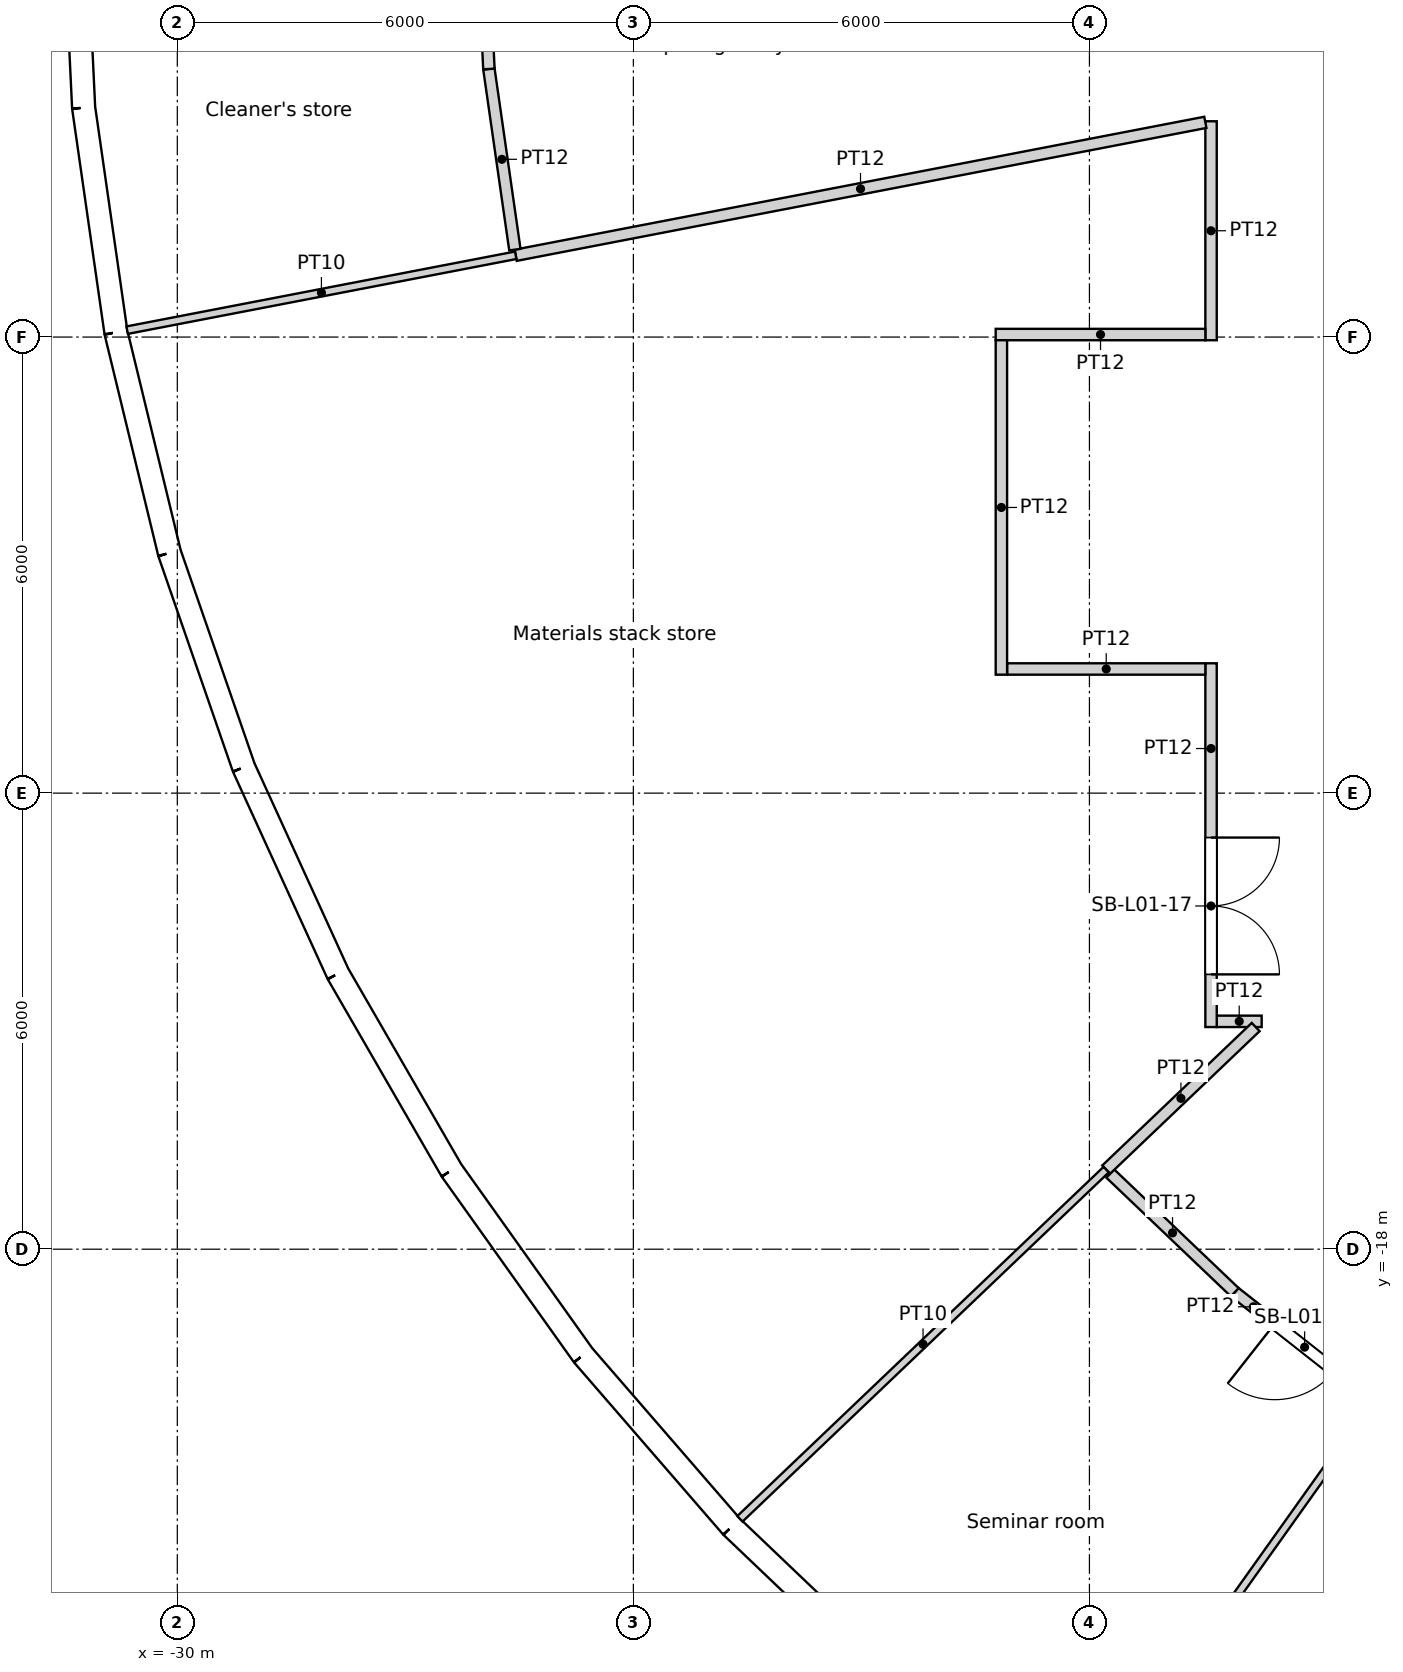
"""IFC4 building model, lengths in metres.
Left out: names, types, materials, properties, quantities, classifications, styles, units other than length and angle.
Written with IfcOpenShell. Run it as: python <this file> out.ifc"""

import sys

from ifc_helpers import new_model, si_unit, direction, frame, frame_2d, origin, origin_2d, place, context, subcontext, project, spatial, rectangle, circle, extrude, element, fill, save


model = new_model("IFC4")
c1 = context("Model", 3, precision=1e-05, world=origin(), true_north=direction((0.0, 1.0)))
c2 = subcontext(c1, "Body", "Model", "MODEL_VIEW")
j1 = project(units=[si_unit("LENGTHUNIT", "METRE"), si_unit("PLANEANGLEUNIT", "RADIAN")], contexts=[c1])
p1 = place(None, origin())
s1 = spatial("IfcSite", under=j1, at=p1, CompositionType="ELEMENT")
p2 = place(p1, origin())
s2 = spatial("IfcBuilding", under=s1, at=p2, CompositionType="ELEMENT")
p3 = place(p2, frame((0.0, 0.0, 9.0)))
s3 = spatial("IfcBuildingStorey", under=s2, at=p3, CompositionType="ELEMENT", Elevation=9.0)
for number, where, z_axis, x_axis in (
    (1, (-30.137, -2.878, 0.0), (0.0, 0.0, 1.0), (1.0, 0.0, 0.0)),
    (2, (-29.048, -8.529, 0.0), (0.0, 0.0, 1.0), (1.0, 0.0, 0.0)),
    (3, (-26.909, -13.873, 0.0), (0.0, 0.0, 1.0), (1.0, 0.0, 0.0)),
    (4, (-23.797, -18.715, 0.0), (0.0, 0.0, 1.0), (1.0, 0.0, 0.0)),
    (5, (-19.826, -22.88, 0.0), (0.0, 0.0, 1.0), (1.0, 0.0, 0.0)),
):
    element("IfcColumn", number, at=place(p3, frame(where, z_axis=z_axis, x_axis=x_axis)), inside=s3, PredefinedType="COLUMN", context=c2, shape_type="SweptSolid", body=[
        extrude(circle(Radius=0.7, at=origin_2d()), origin(), (0.0, 0.0, 1.0), 4.8),
    ])
for number, where, z_axis, x_axis in (
    (6, (-24.382, -2.85, 0.0), (0.0, 0.0, 1.0), (1.0, 0.0, 0.0)),
    (7, (-23.067, -8.396, 0.0), (0.0, 0.0, 1.0), (1.0, 0.0, 0.0)),
    (8, (-20.509, -13.489, 0.0), (0.0, 0.0, 1.0), (1.0, 0.0, 0.0)),
    (9, (-16.846, -17.855, 0.0), (0.0, 0.0, 1.0), (1.0, 0.0, 0.0)),
):
    element("IfcColumn", number, at=place(p3, frame(where, z_axis=z_axis, x_axis=x_axis)), inside=s3, PredefinedType="COLUMN", context=c2, shape_type="SweptSolid", body=[
        extrude(circle(Radius=0.75, at=origin_2d()), origin(), (0.0, 0.0, 1.0), 4.8),
    ])
for number, where, z_axis, x_axis in (
    (10, (-18.612, -2.805, 0.0), (0.0, 0.0, 1.0), (1.0, 0.0, 0.0)),
    (11, (-16.958, -8.167, 0.0), (0.0, 0.0, 1.0), (1.0, 0.0, 0.0)),
):
    element("IfcColumn", number, at=place(p3, frame(where, z_axis=z_axis, x_axis=x_axis)), inside=s3, PredefinedType="COLUMN", context=c2, shape_type="SweptSolid", body=[
        extrude(circle(Radius=0.8, at=origin_2d()), origin(), (0.0, 0.0, 1.0), 4.8),
    ])
p4 = place(p3, frame((-31.375, 0.0, 0.0), z_axis=(0.0, 0.0, 1.0), x_axis=(0.047588458579, -0.998867027492, 0.0)))
e12 = element("IfcWall", 12, at=p4, inside=s3, PredefinedType="SOLIDWALL", context=c2, shape_type="SweptSolid", body=[
    extrude(rectangle(XDim=2.986, YDim=0.3, at=frame_2d((1.493, 0.0))), origin(), (0.0, 0.0, 1.0), 4.35),
])
p5 = place(p4, frame((1.493, 0.0, 2.0)))
e13 = element("IfcOpeningElement", 13, at=p5, cuts=e12, PredefinedType="OPENING", context=c2, shape_type="SweptSolid", body=[
    extrude(circle(Radius=1.2, at=origin_2d()), frame((0.0, 0.16, 0.0), z_axis=(0.0, -1.0, 0.0), x_axis=(1.0, 0.0, 0.0)), (0.0, 0.0, 1.0), 0.32),
])
p6 = place(p3, frame((-31.232, -2.982, 0.0), z_axis=(0.0, 0.0, 1.0), x_axis=(0.142360001917, -0.989814947278, 0.0)))
e14 = element("IfcWall", 14, at=p6, inside=s3, PredefinedType="SOLIDWALL", context=c2, shape_type="SweptSolid", body=[
    extrude(rectangle(XDim=2.986, YDim=0.3, at=frame_2d((1.493, 0.0))), origin(), (0.0, 0.0, 1.0), 4.35),
])
p7 = place(p6, frame((1.493, 0.0, 2.0)))
e15 = element("IfcOpeningElement", 15, at=p7, cuts=e14, PredefinedType="OPENING", context=c2, shape_type="SweptSolid", body=[
    extrude(circle(Radius=1.2, at=origin_2d()), frame((0.0, 0.16, 0.0), z_axis=(0.0, -1.0, 0.0), x_axis=(1.0, 0.0, 0.0)), (0.0, 0.0, 1.0), 0.32),
])
p8 = place(p3, frame((-30.807, -5.938, 0.0), z_axis=(0.0, 0.0, 1.0), x_axis=(0.235756834479, -0.971812078026, 0.0)))
e16 = element("IfcWall", 16, at=p8, inside=s3, PredefinedType="SOLIDWALL", context=c2, shape_type="SweptSolid", body=[
    extrude(rectangle(XDim=2.986, YDim=0.3, at=frame_2d((1.493, 0.0))), origin(), (0.0, 0.0, 1.0), 4.35),
])
p9 = place(p8, frame((1.493, 0.0, 2.0)))
e17 = element("IfcOpeningElement", 17, at=p9, cuts=e16, PredefinedType="OPENING", context=c2, shape_type="SweptSolid", body=[
    extrude(circle(Radius=1.2, at=origin_2d()), frame((0.0, 0.16, 0.0), z_axis=(0.0, -1.0, 0.0), x_axis=(1.0, 0.0, 0.0)), (0.0, 0.0, 1.0), 0.32),
])
p10 = place(p3, frame((-30.104, -8.839, 0.0), z_axis=(0.0, 0.0, 1.0), x_axis=(0.327074054052, -0.944998710669, 0.0)))
e18 = element("IfcWall", 18, at=p10, inside=s3, PredefinedType="SOLIDWALL", context=c2, shape_type="SweptSolid", body=[
    extrude(rectangle(XDim=2.986, YDim=0.3, at=frame_2d((1.493, 0.0))), origin(), (0.0, 0.0, 1.0), 4.35),
])
p11 = place(p10, frame((1.493, 0.0, 2.0)))
e19 = element("IfcOpeningElement", 19, at=p11, cuts=e18, PredefinedType="OPENING", context=c2, shape_type="SweptSolid", body=[
    extrude(circle(Radius=1.2, at=origin_2d()), frame((0.0, 0.16, 0.0), z_axis=(0.0, -1.0, 0.0), x_axis=(1.0, 0.0, 0.0)), (0.0, 0.0, 1.0), 0.32),
])
p12 = place(p3, frame((-29.127, -11.661, 0.0), z_axis=(0.0, 0.0, 1.0), x_axis=(0.415373250944, -0.909651066289, 0.0)))
e20 = element("IfcWall", 20, at=p12, inside=s3, PredefinedType="SOLIDWALL", context=c2, shape_type="SweptSolid", body=[
    extrude(rectangle(XDim=2.986, YDim=0.3, at=frame_2d((1.493, 0.0))), origin(), (0.0, 0.0, 1.0), 4.35),
])
p13 = place(p12, frame((1.493, 0.0, 2.0)))
e21 = element("IfcOpeningElement", 21, at=p13, cuts=e20, PredefinedType="OPENING", context=c2, shape_type="SweptSolid", body=[
    extrude(circle(Radius=1.2, at=origin_2d()), frame((0.0, 0.16, 0.0), z_axis=(0.0, -1.0, 0.0), x_axis=(1.0, 0.0, 0.0)), (0.0, 0.0, 1.0), 0.32),
])
p14 = place(p3, frame((-27.887, -14.377, 0.0), z_axis=(0.0, 0.0, 1.0), x_axis=(0.500017373705, -0.866015372839, 0.0)))
e22 = element("IfcWall", 22, at=p14, inside=s3, PredefinedType="SOLIDWALL", context=c2, shape_type="SweptSolid", body=[
    extrude(rectangle(XDim=2.986, YDim=0.3, at=frame_2d((1.493, 0.0))), origin(), (0.0, 0.0, 1.0), 4.35),
])
p15 = place(p14, frame((1.493, 0.0, 2.0)))
e23 = element("IfcOpeningElement", 23, at=p15, cuts=e22, PredefinedType="OPENING", context=c2, shape_type="SweptSolid", body=[
    extrude(circle(Radius=1.2, at=origin_2d()), frame((0.0, 0.16, 0.0), z_axis=(0.0, -1.0, 0.0), x_axis=(1.0, 0.0, 0.0)), (0.0, 0.0, 1.0), 0.32),
])
p16 = place(p3, frame((-26.394, -16.962, 0.0), z_axis=(0.0, 0.0, 1.0), x_axis=(0.580100533892, -0.814544885551, 0.0)))
e24 = element("IfcWall", 24, at=p16, inside=s3, PredefinedType="SOLIDWALL", context=c2, shape_type="SweptSolid", body=[
    extrude(rectangle(XDim=2.986, YDim=0.3, at=frame_2d((1.493, 0.0))), origin(), (0.0, 0.0, 1.0), 4.35),
])
p17 = place(p16, frame((1.493, 0.0, 2.0)))
e25 = element("IfcOpeningElement", 25, at=p17, cuts=e24, PredefinedType="OPENING", context=c2, shape_type="SweptSolid", body=[
    extrude(circle(Radius=1.2, at=origin_2d()), frame((0.0, 0.16, 0.0), z_axis=(0.0, -1.0, 0.0), x_axis=(1.0, 0.0, 0.0)), (0.0, 0.0, 1.0), 0.32),
])
p18 = place(p3, frame((-24.662, -19.394, 0.0), z_axis=(0.0, 0.0, 1.0), x_axis=(0.654809121128, -0.755794294029, 0.0)))
e26 = element("IfcWall", 26, at=p18, inside=s3, PredefinedType="SOLIDWALL", context=c2, shape_type="SweptSolid", body=[
    extrude(rectangle(XDim=2.986, YDim=0.3, at=frame_2d((1.493, 0.0))), origin(), (0.0, 0.0, 1.0), 4.35),
])
p19 = place(p18, frame((1.493, 0.0, 2.0)))
e27 = element("IfcOpeningElement", 27, at=p19, cuts=e26, PredefinedType="OPENING", context=c2, shape_type="SweptSolid", body=[
    extrude(circle(Radius=1.2, at=origin_2d()), frame((0.0, 0.16, 0.0), z_axis=(0.0, -1.0, 0.0), x_axis=(1.0, 0.0, 0.0)), (0.0, 0.0, 1.0), 0.32),
])
p20 = place(p3, frame((-22.707, -21.651, 0.0), z_axis=(0.0, 0.0, 1.0), x_axis=(0.723750841228, -0.690061388444, 0.0)))
e28 = element("IfcWall", 28, at=p20, inside=s3, PredefinedType="SOLIDWALL", context=c2, shape_type="SweptSolid", body=[
    extrude(rectangle(XDim=2.986, YDim=0.3, at=frame_2d((1.493, 0.0))), origin(), (0.0, 0.0, 1.0), 4.35),
])
p21 = place(p20, frame((1.493, 0.0, 2.0)))
e29 = element("IfcOpeningElement", 29, at=p21, cuts=e28, PredefinedType="OPENING", context=c2, shape_type="SweptSolid", body=[
    extrude(circle(Radius=1.2, at=origin_2d()), frame((0.0, 0.16, 0.0), z_axis=(0.0, -1.0, 0.0), x_axis=(1.0, 0.0, 0.0)), (0.0, 0.0, 1.0), 0.32),
])
p22 = place(p3, frame((-30.66, -5.909, 0.0), z_axis=(0.0, 0.0, 1.0), x_axis=(0.981932782009, 0.189230049451, 0.0)))
e30 = element("IfcWall", 30, at=p22, inside=s3, PredefinedType="PARTITIONING", context=c2, shape_type="SweptSolid", body=[
    extrude(rectangle(XDim=5.206, YDim=0.1, at=frame_2d((2.603, 0.0))), origin(), (0.0, 0.0, 1.0), 3.75),
])
p23 = place(p3, frame((-25.901, -2.473, 0.0), z_axis=(0.0, 0.0, 1.0), x_axis=(-0.047565149415, 0.998868137724, 0.0)))
e31 = element("IfcWall", 31, at=p23, inside=s3, PredefinedType="PARTITIONING", context=c2, shape_type="SweptSolid", body=[
    extrude(rectangle(XDim=2.551, YDim=0.15, at=frame_2d((1.275, 0.0))), origin(), (0.0, 0.0, 1.0), 3.75),
])
p24 = place(p23, frame((0.788, 0.0, 0.0)))
e32 = element("IfcOpeningElement", 32, at=p24, cuts=e31, PredefinedType="OPENING", context=c2, shape_type="SweptSolid", body=[
    extrude(rectangle(XDim=0.9, YDim=2.1, at=frame_2d((0.45, 1.05))), frame((0.0, 0.075, 0.0), z_axis=(0.0, -1.0, 0.0), x_axis=(1.0, 0.0, 0.0)), (0.0, 0.0, 1.0), 0.15),
])
p25 = place(p3, frame((-25.901, -2.473, 0.0), z_axis=(0.0, 0.0, 1.0), x_axis=(0.142360874309, -0.989814821806, 0.0)))
e33 = element("IfcWall", 33, at=p25, inside=s3, PredefinedType="PARTITIONING", context=c2, shape_type="SweptSolid", body=[
    extrude(rectangle(XDim=2.401, YDim=0.15, at=frame_2d((1.2, 0.0))), origin(), (0.0, 0.0, 1.0), 3.75),
])
p26 = place(p3, frame((-25.548, -4.924, 0.0), z_axis=(0.0, 0.0, 1.0), x_axis=(0.981926640708, 0.189261914468, 0.0)))
e34 = element("IfcWall", 34, at=p26, inside=s3, PredefinedType="PARTITIONING", context=c2, shape_type="SweptSolid", body=[
    extrude(rectangle(XDim=9.24, YDim=0.15, at=frame_2d((4.62, 0.0))), origin(), (0.0, 0.0, 1.0), 3.75),
])
p27 = place(p3, frame((-22.598, -21.547, 0.0), z_axis=(0.0, 0.0, 1.0), x_axis=(0.723738396813, 0.690074440172, 0.0)))
e35 = element("IfcWall", 35, at=p27, inside=s3, PredefinedType="PARTITIONING", context=c2, shape_type="SweptSolid", body=[
    extrude(rectangle(XDim=6.658, YDim=0.1, at=frame_2d((3.329, 0.0))), origin(), (0.0, 0.0, 1.0), 3.75),
])
p28 = place(p3, frame((-19.083, -10.367, 0.0), z_axis=(0.0, 0.0, 1.0), x_axis=(1.0, 0.0, 0.0)))
e36 = element("IfcWall", 36, at=p28, inside=s3, PredefinedType="PARTITIONING", context=c2, shape_type="SweptSolid", body=[
    extrude(rectangle(XDim=2.608, YDim=0.15, at=frame_2d((1.304, 0.0))), origin(), (0.0, 0.0, 1.0), 3.75),
])
p29 = place(p3, frame((-19.158, -6.042, 0.0), z_axis=(0.0, 0.0, 1.0), x_axis=(0.0, -1.0, 0.0)))
e37 = element("IfcWall", 37, at=p29, inside=s3, PredefinedType="PARTITIONING", context=c2, shape_type="SweptSolid", body=[
    extrude(rectangle(XDim=4.4, YDim=0.15, at=frame_2d((2.2, 0.0))), origin(), (0.0, 0.0, 1.0), 3.75),
])
p30 = place(p3, frame((-18.112, -25.435, 0.0), z_axis=(0.0, 0.0, 1.0), x_axis=(0.580055201519, 0.814577168346, 0.0)))
e38 = element("IfcWall", 38, at=p30, inside=s3, PredefinedType="PARTITIONING", context=c2, shape_type="SweptSolid", body=[
    extrude(rectangle(XDim=6.582, YDim=0.1, at=frame_2d((3.291, 0.0))), origin(), (0.0, 0.0, 1.0), 3.75),
])
p31 = place(p3, frame((-17.726, -17.005, 0.0), z_axis=(0.0, 0.0, 1.0), x_axis=(0.723737544967, -0.690075333573, 0.0)))
e39 = element("IfcWall", 39, at=p31, inside=s3, PredefinedType="PARTITIONING", context=c2, shape_type="SweptSolid", body=[
    extrude(rectangle(XDim=2.263, YDim=0.15, at=frame_2d((1.131, 0.0))), origin(), (0.0, 0.0, 1.0), 3.75),
])
p32 = place(p3, frame((-17.78, -16.953, 0.0), z_axis=(0.0, 0.0, 1.0), x_axis=(0.723749021552, 0.690063296954, 0.0)))
e40 = element("IfcWall", 40, at=p32, inside=s3, PredefinedType="PARTITIONING", context=c2, shape_type="SweptSolid", body=[
    extrude(rectangle(XDim=2.718, YDim=0.15, at=frame_2d((1.359, 0.0))), origin(), (0.0, 0.0, 1.0), 3.75),
])
p33 = place(p3, frame((-16.325, -15.002, 0.0), z_axis=(0.0, 0.0, 1.0), x_axis=(1.0, 0.0, 0.0)))
e41 = element("IfcWall", 41, at=p33, inside=s3, PredefinedType="PARTITIONING", context=c2, shape_type="SweptSolid", body=[
    extrude(rectangle(XDim=0.591, YDim=0.15, at=frame_2d((0.295, 0.0))), origin(), (0.0, 0.0, 1.0), 3.75),
])
p34 = place(p3, frame((-16.4, -15.077, 0.0), z_axis=(0.0, 0.0, 1.0), x_axis=(0.0, 1.0, 0.0)))
e42 = element("IfcWall", 42, at=p34, inside=s3, PredefinedType="PARTITIONING", context=c2, shape_type="SweptSolid", body=[
    extrude(rectangle(XDim=4.786, YDim=0.15, at=frame_2d((2.393, 0.0))), origin(), (0.0, 0.0, 1.0), 3.75),
])
p35 = place(p34, frame((0.693, 0.0, 0.0)))
e43 = element("IfcOpeningElement", 43, at=p35, cuts=e42, PredefinedType="OPENING", context=c2, shape_type="SweptSolid", body=[
    extrude(rectangle(XDim=1.8, YDim=2.4, at=frame_2d((0.9, 1.2))), frame((0.0, 0.075, 0.0), z_axis=(0.0, -1.0, 0.0), x_axis=(1.0, 0.0, 0.0)), (0.0, 0.0, 1.0), 0.15),
])
p36 = place(p3, frame((-16.475, -5.967, 0.0), z_axis=(0.0, 0.0, 1.0), x_axis=(-1.0, 0.0, 0.0)))
e44 = element("IfcWall", 44, at=p36, inside=s3, PredefinedType="PARTITIONING", context=c2, shape_type="SweptSolid", body=[
    extrude(rectangle(XDim=2.758, YDim=0.15, at=frame_2d((1.379, 0.0))), origin(), (0.0, 0.0, 1.0), 3.75),
])
p37 = place(p3, frame((-16.4, -3.161, 0.0), z_axis=(0.0, 0.0, 1.0), x_axis=(0.0, -1.0, 0.0)))
e45 = element("IfcWall", 45, at=p37, inside=s3, PredefinedType="PARTITIONING", context=c2, shape_type="SweptSolid", body=[
    extrude(rectangle(XDim=2.881, YDim=0.15, at=frame_2d((1.44, 0.0))), origin(), (0.0, 0.0, 1.0), 3.75),
])
p38 = place(p3, frame((-14.25, -20.011, 0.0), z_axis=(0.0, 0.0, 1.0), x_axis=(-0.786108126536, 0.618089001191, 0.0)))
e46 = element("IfcWall", 46, at=p38, inside=s3, PredefinedType="PARTITIONING", context=c2, shape_type="SweptSolid", body=[
    extrude(rectangle(XDim=2.338, YDim=0.15, at=frame_2d((1.169, 0.0))), origin(), (0.0, 0.0, 1.0), 3.75),
])
p39 = place(p38, frame((0.669, 0.0, 0.0)))
e47 = element("IfcOpeningElement", 47, at=p39, cuts=e46, PredefinedType="OPENING", context=c2, shape_type="SweptSolid", body=[
    extrude(rectangle(XDim=1.0, YDim=2.1, at=frame_2d((0.5, 1.05))), frame((0.0, 0.075, 0.0), z_axis=(0.0, -1.0, 0.0), x_axis=(1.0, 0.0, 0.0)), (0.0, 0.0, 1.0), 0.15),
])
p40 = place(p5, origin())
e48 = element("IfcWindow", 48, at=p40, inside=s3, PartitioningType="SINGLE_PANEL", PredefinedType="WINDOW", context=c2, shape_type="SweptSolid", body=[
    extrude(circle(Radius=1.2, at=origin_2d()), frame((0.0, 0.12, 0.0), z_axis=(0.0, -1.0, 0.0), x_axis=(1.0, 0.0, 0.0)), (0.0, 0.0, 1.0), 0.1),
])
fill(e13, e48)
p41 = place(p7, origin())
e49 = element("IfcWindow", 49, at=p41, inside=s3, PartitioningType="SINGLE_PANEL", PredefinedType="WINDOW", context=c2, shape_type="SweptSolid", body=[
    extrude(circle(Radius=1.2, at=origin_2d()), frame((0.0, 0.12, 0.0), z_axis=(0.0, -1.0, 0.0), x_axis=(1.0, 0.0, 0.0)), (0.0, 0.0, 1.0), 0.1),
])
fill(e15, e49)
p42 = place(p9, origin())
e50 = element("IfcWindow", 50, at=p42, inside=s3, PartitioningType="SINGLE_PANEL", PredefinedType="WINDOW", context=c2, shape_type="SweptSolid", body=[
    extrude(circle(Radius=1.2, at=origin_2d()), frame((0.0, 0.12, 0.0), z_axis=(0.0, -1.0, 0.0), x_axis=(1.0, 0.0, 0.0)), (0.0, 0.0, 1.0), 0.1),
])
fill(e17, e50)
p43 = place(p11, origin())
e51 = element("IfcWindow", 51, at=p43, inside=s3, PartitioningType="SINGLE_PANEL", PredefinedType="WINDOW", context=c2, shape_type="SweptSolid", body=[
    extrude(circle(Radius=1.2, at=origin_2d()), frame((0.0, 0.12, 0.0), z_axis=(0.0, -1.0, 0.0), x_axis=(1.0, 0.0, 0.0)), (0.0, 0.0, 1.0), 0.1),
])
fill(e19, e51)
p44 = place(p13, origin())
e52 = element("IfcWindow", 52, at=p44, inside=s3, PartitioningType="SINGLE_PANEL", PredefinedType="WINDOW", context=c2, shape_type="SweptSolid", body=[
    extrude(circle(Radius=1.2, at=origin_2d()), frame((0.0, 0.12, 0.0), z_axis=(0.0, -1.0, 0.0), x_axis=(1.0, 0.0, 0.0)), (0.0, 0.0, 1.0), 0.1),
])
fill(e21, e52)
p45 = place(p15, origin())
e53 = element("IfcWindow", 53, at=p45, inside=s3, PartitioningType="SINGLE_PANEL", PredefinedType="WINDOW", context=c2, shape_type="SweptSolid", body=[
    extrude(circle(Radius=1.2, at=origin_2d()), frame((0.0, 0.12, 0.0), z_axis=(0.0, -1.0, 0.0), x_axis=(1.0, 0.0, 0.0)), (0.0, 0.0, 1.0), 0.1),
])
fill(e23, e53)
p46 = place(p17, origin())
e54 = element("IfcWindow", 54, at=p46, inside=s3, PartitioningType="SINGLE_PANEL", PredefinedType="WINDOW", context=c2, shape_type="SweptSolid", body=[
    extrude(circle(Radius=1.2, at=origin_2d()), frame((0.0, 0.12, 0.0), z_axis=(0.0, -1.0, 0.0), x_axis=(1.0, 0.0, 0.0)), (0.0, 0.0, 1.0), 0.1),
])
fill(e25, e54)
p47 = place(p19, origin())
e55 = element("IfcWindow", 55, at=p47, inside=s3, PartitioningType="SINGLE_PANEL", PredefinedType="WINDOW", context=c2, shape_type="SweptSolid", body=[
    extrude(circle(Radius=1.2, at=origin_2d()), frame((0.0, 0.12, 0.0), z_axis=(0.0, -1.0, 0.0), x_axis=(1.0, 0.0, 0.0)), (0.0, 0.0, 1.0), 0.1),
])
fill(e27, e55)
p48 = place(p21, origin())
e56 = element("IfcWindow", 56, at=p48, inside=s3, PartitioningType="SINGLE_PANEL", PredefinedType="WINDOW", context=c2, shape_type="SweptSolid", body=[
    extrude(circle(Radius=1.2, at=origin_2d()), frame((0.0, 0.12, 0.0), z_axis=(0.0, -1.0, 0.0), x_axis=(1.0, 0.0, 0.0)), (0.0, 0.0, 1.0), 0.1),
])
fill(e29, e56)
p49 = place(p35, origin())
e57 = element("IfcDoor", 57, at=p49, inside=s3, OperationType="DOUBLE_DOOR_SINGLE_SWING", PredefinedType="DOOR", context=c2, shape_type="SweptSolid", body=[
    extrude(rectangle(XDim=1.8, YDim=2.4, at=frame_2d((0.9, 1.2))), frame((0.0, 0.025, 0.0), z_axis=(0.0, -1.0, 0.0), x_axis=(1.0, 0.0, 0.0)), (0.0, 0.0, 1.0), 0.05),
])
fill(e43, e57)
p50 = place(p39, origin())
e58 = element("IfcDoor", 58, at=p50, inside=s3, OperationType="SINGLE_SWING_RIGHT", PredefinedType="DOOR", context=c2, shape_type="SweptSolid", body=[
    extrude(rectangle(XDim=1.0, YDim=2.1, at=frame_2d((0.5, 1.05))), frame((0.0, 0.025, 0.0), z_axis=(0.0, -1.0, 0.0), x_axis=(1.0, 0.0, 0.0)), (0.0, 0.0, 1.0), 0.05),
])
fill(e47, e58)
save(model, sys.argv[1])
